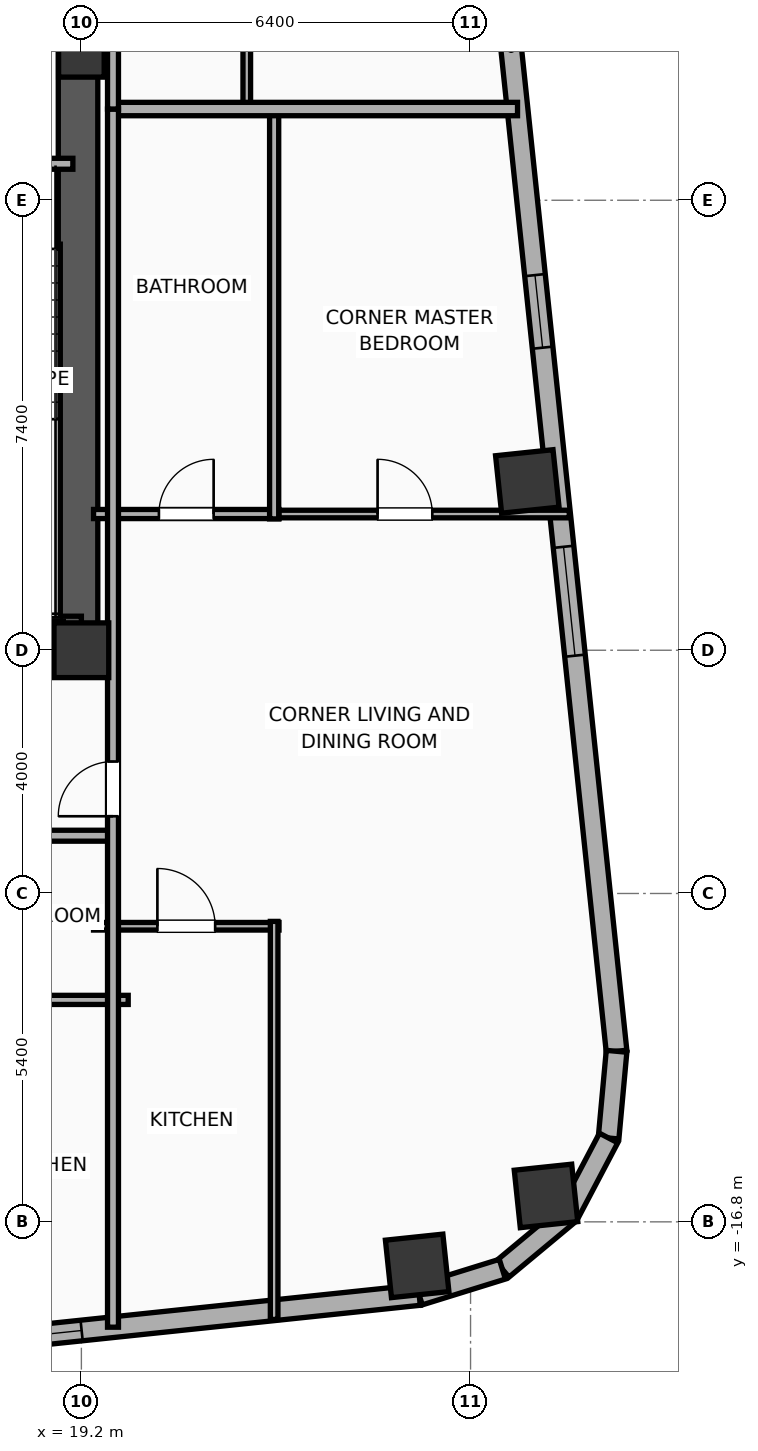
"""IFC4 building model, lengths in metres.
Left out: names, types, materials, properties, quantities, classifications, styles, units other than length and angle.
Written with IfcOpenShell. Run it as: python <this file> out.ifc"""

import sys

from ifc_helpers import new_model, si_unit, direction, frame, frame_2d, origin, origin_2d, place, context, subcontext, project, spatial, rectangle, hollow_rectangle, hollow_circle, extrude, element, fill, save


model = new_model("IFC4")
c1 = context("Model", 3, precision=1e-05, world=origin(), true_north=direction((0.0, 1.0)))
c2 = subcontext(c1, "Body", "Model", "MODEL_VIEW")
j1 = project(units=[si_unit("LENGTHUNIT", "METRE"), si_unit("PLANEANGLEUNIT", "RADIAN")], contexts=[c1])
p1 = place(None, origin())
s1 = spatial("IfcSite", under=j1, at=p1, CompositionType="ELEMENT")
p2 = place(p1, origin())
s2 = spatial("IfcBuilding", under=s1, at=p2, CompositionType="ELEMENT")
p3 = place(p2, frame((0.0, 0.0, 163.8)))
s3 = spatial("IfcBuildingStorey", under=s2, at=p3, CompositionType="ELEMENT", Elevation=163.8)
p4 = place(p3, frame((19.2, -7.4, 0.0), z_axis=(0.0, 0.0, 1.0), x_axis=(1.0, 0.0, 0.0)))
e1 = element("IfcColumn", 1, at=p4, inside=s3, PredefinedType="COLUMN", context=c2, shape_type="SweptSolid", body=[
    extrude(rectangle(XDim=0.9, YDim=0.9, at=origin_2d()), origin(), (0.0, 0.0, 1.0), 3.9),
])
p5 = place(p3, frame((19.2, 2.4, 0.0), z_axis=(0.0, 0.0, 1.0), x_axis=(1.0, 0.0, 0.0)))
e2 = element("IfcColumn", 2, at=p5, inside=s3, PredefinedType="COLUMN", context=c2, shape_type="SweptSolid", body=[
    extrude(rectangle(XDim=0.75, YDim=0.75, at=origin_2d()), origin(), (0.0, 0.0, 1.0), 3.9),
])
p6 = place(p3, frame((12.175, -7.4, 0.0), z_axis=(0.0, 0.0, 1.0), x_axis=(1.0, 0.0, 0.0)))
e3 = element("IfcWall", 3, at=p6, inside=s3, PredefinedType="SHEAR", context=c2, shape_type="SweptSolid", body=[
    extrude(rectangle(XDim=7.25, YDim=0.45, at=frame_2d((3.625, 0.0))), origin(), (0.0, 0.0, 1.0), 3.65),
])
p7 = place(p3, frame((19.145, -7.4, 0.0), z_axis=(0.0, 0.0, 1.0), x_axis=(0.0, 1.0, 0.0)))
e4 = element("IfcWall", 4, at=p7, inside=s3, PredefinedType="SHEAR", context=c2, shape_type="SweptSolid", body=[
    extrude(rectangle(XDim=14.8, YDim=0.65, at=frame_2d((7.4, 0.0))), origin(), (0.0, 0.0, 1.0), 3.65),
])
p8 = place(p3, frame((15.74, -6.965, 0.0), z_axis=(0.0, 0.0, 1.0), x_axis=(1.0, 0.0, 0.0)))
e5 = element("IfcWall", 5, at=p8, inside=s3, PredefinedType="SOLIDWALL", context=c2, shape_type="SweptSolid", body=[
    extrude(rectangle(XDim=3.46, YDim=0.25, at=frame_2d((1.73, 0.0))), origin(), (0.0, 0.0, 1.0), 3.65),
])
p9 = place(p3, frame((24.722, -17.524, 0.0), z_axis=(0.0, 0.0, 1.0), x_axis=(0.994521895368, 0.104528463268, 0.0)))
e6 = element("IfcColumn", 6, at=p9, inside=s3, PredefinedType="COLUMN", context=c2, shape_type="SweptSolid", body=[
    extrude(hollow_rectangle(XDim=0.95, YDim=0.95, WallThickness=0.032, at=origin_2d()), origin(), (0.0, 0.0, 1.0), 3.9),
])
p10 = place(p3, frame((26.841, -16.374, 0.0), z_axis=(0.0, 0.0, 1.0), x_axis=(0.994521895368, 0.104528463268, 0.0)))
e7 = element("IfcColumn", 7, at=p10, inside=s3, PredefinedType="COLUMN", context=c2, shape_type="SweptSolid", body=[
    extrude(hollow_circle(Radius=0.475, WallThickness=0.032, at=origin_2d()), origin(), (0.0, 0.0, 1.0), 3.9),
])
p11 = place(p3, frame((26.533, -4.624, 0.0), z_axis=(0.0, 0.0, 1.0), x_axis=(0.994521895368, 0.104528463268, 0.0)))
e8 = element("IfcColumn", 8, at=p11, inside=s3, PredefinedType="COLUMN", context=c2, shape_type="SweptSolid", body=[
    extrude(hollow_rectangle(XDim=0.95, YDim=0.95, WallThickness=0.032, at=origin_2d()), origin(), (0.0, 0.0, 1.0), 3.9),
])
p12 = place(p3, frame((24.756, -18.003, 0.0), z_axis=(0.0, 0.0, 1.0), x_axis=(-0.99452160744, -0.104531202687, 0.0)))
e9 = element("IfcWall", 9, at=p12, inside=s3, PredefinedType="ELEMENTEDWALL", context=c2, shape_type="SweptSolid", body=[
    extrude(rectangle(XDim=51.967, YDim=0.34, at=frame_2d((25.983, 0.0))), origin(), (0.0, 0.0, 1.0), 3.65),
])
p13 = place(p12, frame((25.633, 0.0, 0.75)))
e10 = element("IfcOpeningElement", 10, at=p13, cuts=e9, PredefinedType="OPENING", context=c2, shape_type="SweptSolid", body=[
    extrude(rectangle(XDim=2.4, YDim=2.1, at=frame_2d((1.2, 1.05))), frame((0.0, 0.18, 0.0), z_axis=(0.0, -1.0, 0.0), x_axis=(1.0, 0.0, 0.0)), (0.0, 0.0, 1.0), 0.36),
])
p14 = place(p12, frame((42.369, 0.0, 0.75)))
e11 = element("IfcOpeningElement", 11, at=p14, cuts=e9, PredefinedType="OPENING", context=c2, shape_type="SweptSolid", body=[
    extrude(rectangle(XDim=1.2, YDim=2.05, at=frame_2d((0.6, 1.025))), frame((0.0, 0.18, 0.0), z_axis=(0.0, -1.0, 0.0), x_axis=(1.0, 0.0, 0.0)), (0.0, 0.0, 1.0), 0.36),
])
p15 = place(p12, frame((34.085, 0.0, 0.75)))
e12 = element("IfcOpeningElement", 12, at=p15, cuts=e9, PredefinedType="OPENING", context=c2, shape_type="SweptSolid", body=[
    extrude(rectangle(XDim=1.2, YDim=2.05, at=frame_2d((0.6, 1.025))), frame((0.0, 0.18, 0.0), z_axis=(0.0, -1.0, 0.0), x_axis=(1.0, 0.0, 0.0)), (0.0, 0.0, 1.0), 0.36),
])
p16 = place(p12, frame((36.993, 0.0, 0.75)))
e13 = element("IfcOpeningElement", 13, at=p16, cuts=e9, PredefinedType="OPENING", context=c2, shape_type="SweptSolid", body=[
    extrude(rectangle(XDim=1.2, YDim=2.05, at=frame_2d((0.6, 1.025))), frame((0.0, 0.18, 0.0), z_axis=(0.0, -1.0, 0.0), x_axis=(1.0, 0.0, 0.0)), (0.0, 0.0, 1.0), 0.36),
])
p17 = place(p12, frame((14.397, 0.0, 0.75)))
e14 = element("IfcOpeningElement", 14, at=p17, cuts=e9, PredefinedType="OPENING", context=c2, shape_type="SweptSolid", body=[
    extrude(rectangle(XDim=1.2, YDim=2.05, at=frame_2d((0.6, 1.025))), frame((0.0, 0.18, 0.0), z_axis=(0.0, -1.0, 0.0), x_axis=(1.0, 0.0, 0.0)), (0.0, 0.0, 1.0), 0.36),
])
p18 = place(p12, frame((11.489, 0.0, 0.75)))
e15 = element("IfcOpeningElement", 15, at=p18, cuts=e9, PredefinedType="OPENING", context=c2, shape_type="SweptSolid", body=[
    extrude(rectangle(XDim=1.2, YDim=2.05, at=frame_2d((0.6, 1.025))), frame((0.0, 0.18, 0.0), z_axis=(0.0, -1.0, 0.0), x_axis=(1.0, 0.0, 0.0)), (0.0, 0.0, 1.0), 0.36),
])
p19 = place(p12, frame((8.521, 0.0, 0.75)))
e16 = element("IfcOpeningElement", 16, at=p19, cuts=e9, PredefinedType="OPENING", context=c2, shape_type="SweptSolid", body=[
    extrude(rectangle(XDim=1.2, YDim=2.05, at=frame_2d((0.6, 1.025))), frame((0.0, 0.18, 0.0), z_axis=(0.0, -1.0, 0.0), x_axis=(1.0, 0.0, 0.0)), (0.0, 0.0, 1.0), 0.36),
])
p20 = place(p12, frame((5.582, 0.0, 0.75)))
e17 = element("IfcOpeningElement", 17, at=p20, cuts=e9, PredefinedType="OPENING", context=c2, shape_type="SweptSolid", body=[
    extrude(rectangle(XDim=1.2, YDim=2.05, at=frame_2d((0.6, 1.025))), frame((0.0, 0.18, 0.0), z_axis=(0.0, -1.0, 0.0), x_axis=(1.0, 0.0, 0.0)), (0.0, 0.0, 1.0), 0.36),
])
p21 = place(p12, frame((29.313, 0.0, 0.75)))
e18 = element("IfcOpeningElement", 18, at=p21, cuts=e9, PredefinedType="OPENING", context=c2, shape_type="SweptSolid", body=[
    extrude(rectangle(XDim=1.2, YDim=2.05, at=frame_2d((0.6, 1.025))), frame((0.0, 0.18, 0.0), z_axis=(0.0, -1.0, 0.0), x_axis=(1.0, 0.0, 0.0)), (0.0, 0.0, 1.0), 0.36),
])
p22 = place(p12, frame((22.248, 0.0, 0.75)))
e19 = element("IfcOpeningElement", 19, at=p22, cuts=e9, PredefinedType="OPENING", context=c2, shape_type="SweptSolid", body=[
    extrude(rectangle(XDim=1.2, YDim=2.05, at=frame_2d((0.6, 1.025))), frame((0.0, 0.18, 0.0), z_axis=(0.0, -1.0, 0.0), x_axis=(1.0, 0.0, 0.0)), (0.0, 0.0, 1.0), 0.36),
])
p23 = place(p12, frame((18.186, 0.0, 0.75)))
e20 = element("IfcOpeningElement", 20, at=p23, cuts=e9, PredefinedType="OPENING", context=c2, shape_type="SweptSolid", body=[
    extrude(rectangle(XDim=1.2, YDim=2.05, at=frame_2d((0.6, 1.025))), frame((0.0, 0.18, 0.0), z_axis=(0.0, -1.0, 0.0), x_axis=(1.0, 0.0, 0.0)), (0.0, 0.0, 1.0), 0.36),
])
p24 = place(p12, frame((47.879, 0.0, 0.75)))
e21 = element("IfcOpeningElement", 21, at=p24, cuts=e9, PredefinedType="OPENING", context=c2, shape_type="SweptSolid", body=[
    extrude(rectangle(XDim=1.2, YDim=2.05, at=frame_2d((0.6, 1.025))), frame((0.0, 0.18, 0.0), z_axis=(0.0, -1.0, 0.0), x_axis=(1.0, 0.0, 0.0)), (0.0, 0.0, 1.0), 0.36),
])
p25 = place(p12, frame((49.844, 0.0, 0.75)))
e22 = element("IfcOpeningElement", 22, at=p25, cuts=e9, PredefinedType="OPENING", context=c2, shape_type="SweptSolid", body=[
    extrude(rectangle(XDim=1.2, YDim=2.05, at=frame_2d((0.6, 1.025))), frame((0.0, 0.18, 0.0), z_axis=(0.0, -1.0, 0.0), x_axis=(1.0, 0.0, 0.0)), (0.0, 0.0, 1.0), 0.36),
])
p26 = place(p3, frame((24.534, 18.99, 0.0), z_axis=(0.0, 0.0, 1.0), x_axis=(0.104534959766, -0.994521212537, 0.0)))
e23 = element("IfcWall", 23, at=p26, inside=s3, PredefinedType="ELEMENTEDWALL", context=c2, shape_type="SweptSolid", body=[
    extrude(rectangle(XDim=33.166, YDim=0.34, at=frame_2d((16.583, 0.0))), origin(), (0.0, 0.0, 1.0), 3.65),
])
p27 = place(p26, frame((6.542, 0.0, 0.75)))
e24 = element("IfcOpeningElement", 24, at=p27, cuts=e23, PredefinedType="OPENING", context=c2, shape_type="SweptSolid", body=[
    extrude(rectangle(XDim=1.8, YDim=2.1, at=frame_2d((0.9, 1.05))), frame((0.0, 0.18, 0.0), z_axis=(0.0, -1.0, 0.0), x_axis=(1.0, 0.0, 0.0)), (0.0, 0.0, 1.0), 0.36),
])
p28 = place(p26, frame((24.825, 0.0, 0.75)))
e25 = element("IfcOpeningElement", 25, at=p28, cuts=e23, PredefinedType="OPENING", context=c2, shape_type="SweptSolid", body=[
    extrude(rectangle(XDim=1.8, YDim=2.1, at=frame_2d((0.9, 1.05))), frame((0.0, 0.18, 0.0), z_axis=(0.0, -1.0, 0.0), x_axis=(1.0, 0.0, 0.0)), (0.0, 0.0, 1.0), 0.36),
])
p29 = place(p26, frame((20.332, 0.0, 0.75)))
e26 = element("IfcOpeningElement", 26, at=p29, cuts=e23, PredefinedType="OPENING", context=c2, shape_type="SweptSolid", body=[
    extrude(rectangle(XDim=1.2, YDim=2.05, at=frame_2d((0.6, 1.025))), frame((0.0, 0.18, 0.0), z_axis=(0.0, -1.0, 0.0), x_axis=(1.0, 0.0, 0.0)), (0.0, 0.0, 1.0), 0.36),
])
p30 = place(p3, frame((28.001, -13.995, 0.0), z_axis=(0.0, 0.0, 1.0), x_axis=(-0.091534682358, -0.995801888894, 0.0)))
e27 = element("IfcWall", 27, at=p30, inside=s3, PredefinedType="ELEMENTEDWALL", context=c2, shape_type="SweptSolid", body=[
    extrude(rectangle(XDim=1.432, YDim=0.34, at=frame_2d((0.716, 0.0))), origin(), (0.0, 0.0, 1.0), 3.65),
])
for number, where, z_axis, x_axis in (
    (28, (27.87, -15.421, 0.0), (0.0, 0.0, 1.0), (-0.466, -0.885, 0.0)),
    (29, (27.211, -16.674, 0.0), (0.0, 0.0, 1.0), (-0.769, -0.64, 0.0)),
):
    element("IfcWall", number, at=place(p3, frame(where, z_axis=z_axis, x_axis=x_axis)), inside=s3, PredefinedType="ELEMENTEDWALL", context=c2, shape_type="SweptSolid", body=[
        extrude(rectangle(XDim=1.415, YDim=0.34, at=frame_2d((0.708, 0.0))), origin(), (0.0, 0.0, 1.0), 3.65),
    ])
p31 = place(p3, frame((26.123, -17.579, 0.0), z_axis=(0.0, 0.0, 1.0), x_axis=(-0.955042500381, -0.296468923271, 0.0)))
e30 = element("IfcWall", 30, at=p31, inside=s3, PredefinedType="ELEMENTEDWALL", context=c2, shape_type="SweptSolid", body=[
    extrude(rectangle(XDim=1.432, YDim=0.34, at=frame_2d((0.716, 0.0))), origin(), (0.0, 0.0, 1.0), 3.65),
])
p32 = place(p3, frame((15.7, 0.6, 0.0), z_axis=(0.0, 0.0, 1.0), x_axis=(1.0, 0.0, 0.0)))
e31 = element("IfcWall", 31, at=p32, inside=s3, PredefinedType="PARTITIONING", context=c2, shape_type="SweptSolid", body=[
    extrude(rectangle(XDim=3.36, YDim=0.18, at=frame_2d((1.68, 0.0))), origin(), (0.0, 0.0, 1.0), 3.65),
])
p33 = place(p32, frame((1.155, 0.0, 0.0)))
e32 = element("IfcOpeningElement", 32, at=p33, cuts=e31, PredefinedType="OPENING", context=c2, shape_type="SweptSolid", body=[
    extrude(rectangle(XDim=1.05, YDim=2.05, at=frame_2d((0.525, 1.025))), frame((0.0, 0.1, 0.0), z_axis=(0.0, -1.0, 0.0), x_axis=(1.0, 0.0, 0.0)), (0.0, 0.0, 1.0), 0.2),
])
p34 = place(p3, frame((17.42, -13.15, 0.0), z_axis=(0.0, 0.0, 1.0), x_axis=(1.0, 0.0, 0.0)))
e33 = element("IfcWall", 33, at=p34, inside=s3, PredefinedType="PLUMBINGWALL", context=c2, shape_type="SweptSolid", body=[
    extrude(rectangle(XDim=2.55, YDim=0.15, at=frame_2d((1.275, 0.0))), origin(), (0.0, 0.0, 1.0), 3.65),
])
p35 = place(p3, frame((8.08, -10.45, 0.0), z_axis=(0.0, 0.0, 1.0), x_axis=(1.0, 0.0, 0.0)))
e34 = element("IfcWall", 34, at=p35, inside=s3, PredefinedType="PARTITIONING", context=c2, shape_type="SweptSolid", body=[
    extrude(rectangle(XDim=11.67, YDim=0.18, at=frame_2d((5.835, 0.0))), origin(), (0.0, 0.0, 1.0), 3.65),
])
p36 = place(p35, frame((1.213, 0.0, 0.0)))
e35 = element("IfcOpeningElement", 35, at=p36, cuts=e34, PredefinedType="OPENING", context=c2, shape_type="SweptSolid", body=[
    extrude(rectangle(XDim=1.15, YDim=2.05, at=frame_2d((0.575, 1.025))), frame((0.0, 0.1, 0.0), z_axis=(0.0, -1.0, 0.0), x_axis=(1.0, 0.0, 0.0)), (0.0, 0.0, 1.0), 0.2),
])
p37 = place(p35, frame((7.057, 0.0, 0.0)))
e36 = element("IfcOpeningElement", 36, at=p37, cuts=e34, PredefinedType="OPENING", context=c2, shape_type="SweptSolid", body=[
    extrude(rectangle(XDim=1.15, YDim=2.05, at=frame_2d((0.575, 1.025))), frame((0.0, 0.1, 0.0), z_axis=(0.0, -1.0, 0.0), x_axis=(1.0, 0.0, 0.0)), (0.0, 0.0, 1.0), 0.2),
])
p38 = place(p3, frame((22.31, -5.16, 0.0), z_axis=(0.0, 0.0, 1.0), x_axis=(1.0, 0.0, 0.0)))
e37 = element("IfcWall", 37, at=p38, inside=s3, PredefinedType="PARTITIONING", context=c2, shape_type="SweptSolid", body=[
    extrude(rectangle(XDim=4.913, YDim=0.125, at=frame_2d((2.457, 0.0))), origin(), (0.0, 0.0, 1.0), 3.04),
])
p39 = place(p38, frame((1.761, 0.0, 0.0)))
e38 = element("IfcOpeningElement", 38, at=p39, cuts=e37, PredefinedType="OPENING", context=c2, shape_type="SweptSolid", body=[
    extrude(rectangle(XDim=0.9, YDim=2.05, at=frame_2d((0.45, 1.025))), frame((0.0, 0.073, 0.0), z_axis=(0.0, -1.0, 0.0), x_axis=(1.0, 0.0, 0.0)), (0.0, 0.0, 1.0), 0.145),
])
p40 = place(p3, frame((19.4, -11.939, 0.0), z_axis=(0.0, 0.0, 1.0), x_axis=(1.0, 0.0, 0.0)))
e39 = element("IfcWall", 39, at=p40, inside=s3, PredefinedType="PARTITIONING", context=c2, shape_type="SweptSolid", body=[
    extrude(rectangle(XDim=3.05, YDim=0.125, at=frame_2d((1.525, 0.0))), origin(), (0.0, 0.0, 1.0), 3.65),
])
p41 = place(p40, frame((1.05, 0.0, 0.0)))
e40 = element("IfcOpeningElement", 40, at=p41, cuts=e39, PredefinedType="OPENING", context=c2, shape_type="SweptSolid", body=[
    extrude(rectangle(XDim=0.95, YDim=2.05, at=frame_2d((0.475, 1.025))), frame((0.0, 0.073, 0.0), z_axis=(0.0, -1.0, 0.0), x_axis=(1.0, 0.0, 0.0)), (0.0, 0.0, 1.0), 0.145),
])
p42 = place(p3, frame((19.4, -5.16, 0.0), z_axis=(0.0, 0.0, 1.0), x_axis=(1.0, 0.0, 0.0)))
e41 = element("IfcWall", 41, at=p42, inside=s3, PredefinedType="PLUMBINGWALL", context=c2, shape_type="SweptSolid", body=[
    extrude(rectangle(XDim=3.05, YDim=0.15, at=frame_2d((1.525, 0.0))), origin(), (0.0, 0.0, 1.0), 3.65),
])
p43 = place(p42, frame((1.075, 0.0, 0.0)))
e42 = element("IfcOpeningElement", 42, at=p43, cuts=e41, PredefinedType="OPENING", context=c2, shape_type="SweptSolid", body=[
    extrude(rectangle(XDim=0.9, YDim=2.05, at=frame_2d((0.45, 1.025))), frame((0.0, 0.085, 0.0), z_axis=(0.0, -1.0, 0.0), x_axis=(1.0, 0.0, 0.0)), (0.0, 0.0, 1.0), 0.17),
])
p44 = place(p3, frame((22.37, -18.405, 0.0), z_axis=(0.0, 0.0, 1.0), x_axis=(0.0, 1.0, 0.0)))
e43 = element("IfcWall", 43, at=p44, inside=s3, PredefinedType="PARTITIONING", context=c2, shape_type="SweptSolid", body=[
    extrude(rectangle(XDim=6.546, YDim=0.125, at=frame_2d((3.273, 0.0))), origin(), (0.0, 0.0, 1.0), 3.65),
])
p45 = place(p3, frame((22.37, -5.24, 0.0), z_axis=(0.0, 0.0, 1.0), x_axis=(0.0, 1.0, 0.0)))
e44 = element("IfcWall", 44, at=p45, inside=s3, PredefinedType="PLUMBINGWALL", context=c2, shape_type="SweptSolid", body=[
    extrude(rectangle(XDim=6.72, YDim=0.15, at=frame_2d((3.36, 0.0))), origin(), (0.0, 0.0, 1.0), 3.65),
])
p46 = place(p3, frame((21.92, 1.52, 0.0), z_axis=(0.0, 0.0, 1.0), x_axis=(0.0, 1.0, 0.0)))
e45 = element("IfcWall", 45, at=p46, inside=s3, PredefinedType="PARTITIONING", context=c2, shape_type="SweptSolid", body=[
    extrude(rectangle(XDim=6.72, YDim=0.125, at=frame_2d((3.36, 0.0))), origin(), (0.0, 0.0, 1.0), 3.65),
])
p47 = place(p3, frame((19.72, 1.5, 0.0), z_axis=(0.0, 0.0, 1.0), x_axis=(1.0, 0.0, 0.0)))
e46 = element("IfcWall", 46, at=p47, inside=s3, PredefinedType="PARTITIONING", context=c2, shape_type="SweptSolid", body=[
    extrude(rectangle(XDim=6.653, YDim=0.22, at=frame_2d((3.326, 0.0))), origin(), (0.0, 0.0, 1.0), 3.65),
])
p48 = place(p3, frame((19.72, -18.532, 0.0), z_axis=(0.0, 0.0, 1.0), x_axis=(0.0, 1.0, 0.0)))
e47 = element("IfcWall", 47, at=p48, inside=s3, PredefinedType="PARTITIONING", context=c2, shape_type="SweptSolid", body=[
    extrude(rectangle(XDim=20.032, YDim=0.18, at=frame_2d((10.016, 0.0))), origin(), (0.0, 0.0, 1.0), 3.65),
])
p49 = place(p48, frame((8.402, 0.0, 0.0)))
e48 = element("IfcOpeningElement", 48, at=p49, cuts=e47, PredefinedType="OPENING", context=c2, shape_type="SweptSolid", body=[
    extrude(rectangle(XDim=0.9, YDim=2.05, at=frame_2d((0.45, 1.025))), frame((0.0, 0.1, 0.0), z_axis=(0.0, -1.0, 0.0), x_axis=(1.0, 0.0, 0.0)), (0.0, 0.0, 1.0), 0.2),
])
p50 = place(p3, frame((19.72, 1.5, 0.0), z_axis=(0.0, 0.0, 1.0), x_axis=(0.0, 1.0, 0.0)))
e49 = element("IfcWall", 49, at=p50, inside=s3, PredefinedType="PARTITIONING", context=c2, shape_type="SweptSolid", body=[
    extrude(rectangle(XDim=20.65, YDim=0.18, at=frame_2d((10.325, 0.0))), origin(), (0.0, 0.0, 1.0), 3.04),
])
p51 = place(p50, frame((7.729, 0.0, 0.0)))
e50 = element("IfcOpeningElement", 50, at=p51, cuts=e49, PredefinedType="OPENING", context=c2, shape_type="SweptSolid", body=[
    extrude(rectangle(XDim=0.9, YDim=2.05, at=frame_2d((0.45, 1.025))), frame((0.0, 0.1, 0.0), z_axis=(0.0, -1.0, 0.0), x_axis=(1.0, 0.0, 0.0)), (0.0, 0.0, 1.0), 0.2),
])
p52 = place(p28, origin())
e51 = element("IfcWindow", 51, at=p52, inside=s3, PartitioningType="SINGLE_PANEL", PredefinedType="WINDOW", context=c2, shape_type="SweptSolid", body=[
    extrude(rectangle(XDim=1.8, YDim=2.1, at=frame_2d((0.9, 1.05))), frame((0.0, 0.03, 0.0), z_axis=(0.0, -1.0, 0.0), x_axis=(1.0, 0.0, 0.0)), (0.0, 0.0, 1.0), 0.06),
])
fill(e25, e51)
p53 = place(p20, origin())
e52 = element("IfcWindow", 52, at=p53, inside=s3, PartitioningType="SINGLE_PANEL", PredefinedType="WINDOW", context=c2, shape_type="SweptSolid", body=[
    extrude(rectangle(XDim=1.2, YDim=2.05, at=frame_2d((0.6, 1.025))), frame((0.0, 0.03, 0.0), z_axis=(0.0, -1.0, 0.0), x_axis=(1.0, 0.0, 0.0)), (0.0, 0.0, 1.0), 0.06),
])
fill(e17, e52)
p54 = place(p29, origin())
e53 = element("IfcWindow", 53, at=p54, inside=s3, PartitioningType="SINGLE_PANEL", PredefinedType="WINDOW", context=c2, shape_type="SweptSolid", body=[
    extrude(rectangle(XDim=1.2, YDim=2.05, at=frame_2d((0.6, 1.025))), frame((0.0, 0.03, 0.0), z_axis=(0.0, -1.0, 0.0), x_axis=(1.0, 0.0, 0.0)), (0.0, 0.0, 1.0), 0.06),
])
fill(e26, e53)
p55 = place(p39, origin())
e54 = element("IfcDoor", 54, at=p55, inside=s3, OperationType="SINGLE_SWING_LEFT", PredefinedType="DOOR", context=c2, shape_type="SweptSolid", body=[
    extrude(rectangle(XDim=0.9, YDim=2.05, at=frame_2d((0.45, 1.025))), frame((0.0, 0.025, 0.0), z_axis=(0.0, -1.0, 0.0), x_axis=(1.0, 0.0, 0.0)), (0.0, 0.0, 1.0), 0.05),
])
fill(e38, e54)
p56 = place(p41, origin())
e55 = element("IfcDoor", 55, at=p56, inside=s3, OperationType="SINGLE_SWING_LEFT", PredefinedType="DOOR", context=c2, shape_type="SweptSolid", body=[
    extrude(rectangle(XDim=0.95, YDim=2.05, at=frame_2d((0.475, 1.025))), frame((0.0, 0.025, 0.0), z_axis=(0.0, -1.0, 0.0), x_axis=(1.0, 0.0, 0.0)), (0.0, 0.0, 1.0), 0.05),
])
fill(e40, e55)
p57 = place(p43, origin())
e56 = element("IfcDoor", 56, at=p57, inside=s3, OperationType="SINGLE_SWING_RIGHT", PredefinedType="DOOR", context=c2, shape_type="SweptSolid", body=[
    extrude(rectangle(XDim=0.9, YDim=2.05, at=frame_2d((0.45, 1.025))), frame((0.0, 0.025, 0.0), z_axis=(0.0, -1.0, 0.0), x_axis=(1.0, 0.0, 0.0)), (0.0, 0.0, 1.0), 0.05),
])
fill(e42, e56)
p58 = place(p49, origin())
e57 = element("IfcDoor", 57, at=p58, inside=s3, OperationType="SINGLE_SWING_LEFT", PredefinedType="DOOR", context=c2, shape_type="SweptSolid", body=[
    extrude(rectangle(XDim=0.9, YDim=2.05, at=frame_2d((0.45, 1.025))), frame((0.0, 0.025, 0.0), z_axis=(0.0, -1.0, 0.0), x_axis=(1.0, 0.0, 0.0)), (0.0, 0.0, 1.0), 0.05),
])
fill(e48, e57)
save(model, sys.argv[1])
